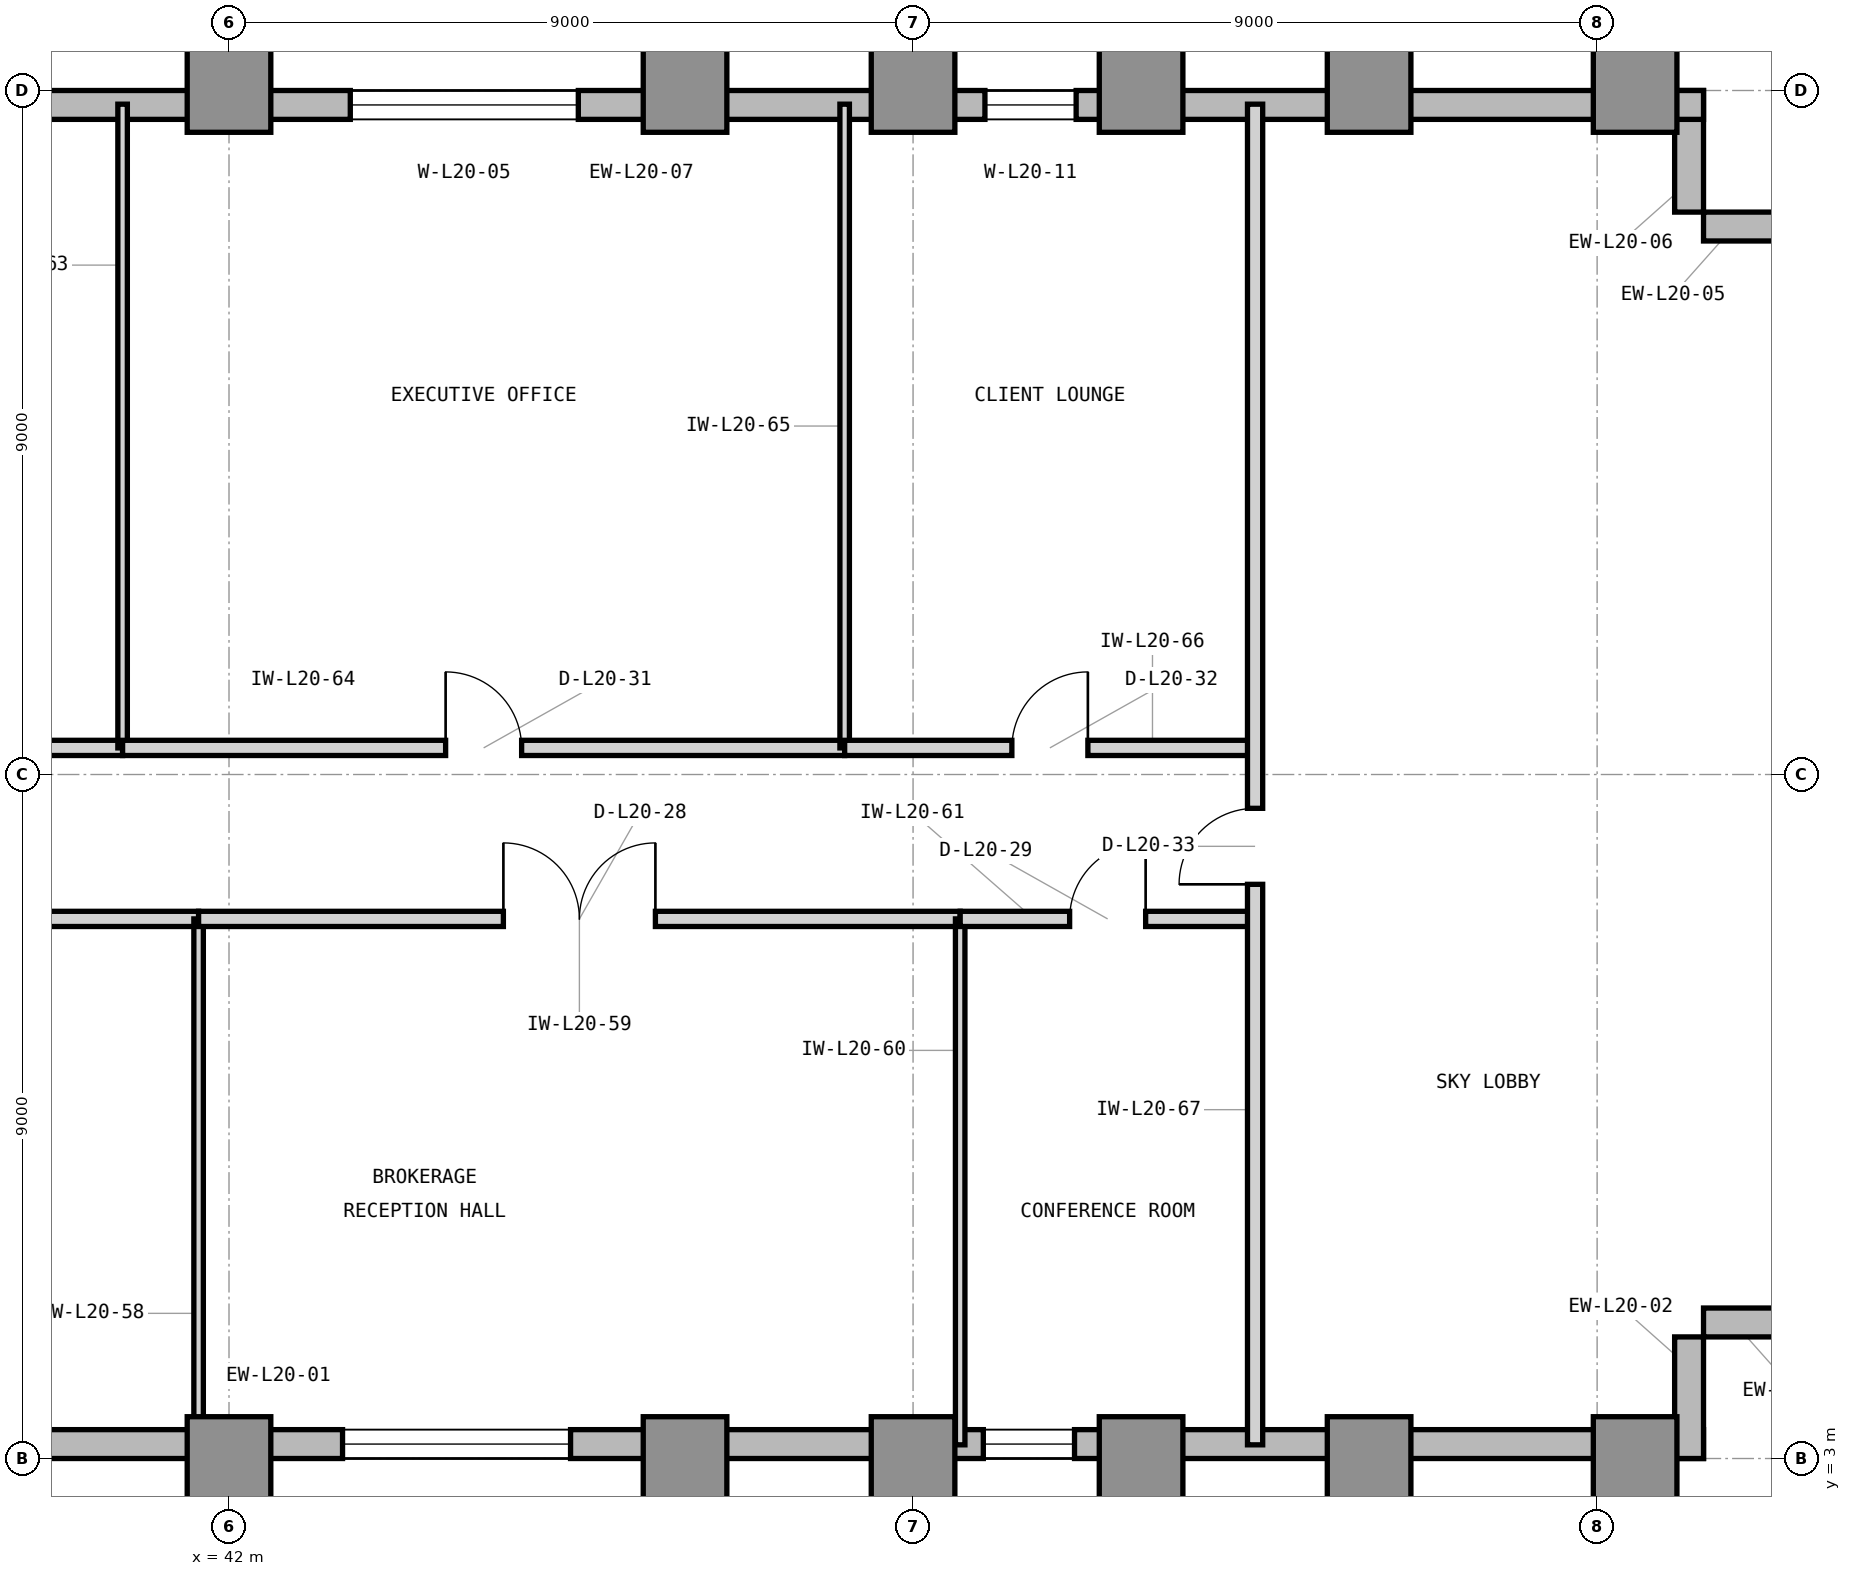
"""IFC4 building model, lengths in metres.
Left out: names, types, materials, properties, quantities, classifications, styles, units other than length and angle.
Written with IfcOpenShell. Run it as: python <this file> out.ifc"""

import sys

from ifc_helpers import new_model, si_unit, direction, frame, frame_2d, origin, origin_2d, place, context, subcontext, project, spatial, rectangle, extrude, element, fill, save


model = new_model("IFC4")
c1 = context("Model", 3, precision=1e-05, world=origin(), true_north=direction((0.0, 1.0)))
c2 = subcontext(c1, "Body", "Model", "MODEL_VIEW")
j1 = project(units=[si_unit("LENGTHUNIT", "METRE"), si_unit("PLANEANGLEUNIT", "RADIAN")], contexts=[c1])
p1 = place(None, origin())
s1 = spatial("IfcSite", under=j1, at=p1, CompositionType="ELEMENT")
p2 = place(p1, origin())
s2 = spatial("IfcBuilding", under=s1, at=p2, CompositionType="ELEMENT")
p3 = place(p2, frame((0.0, 0.0, 89.1)))
s3 = spatial("IfcBuildingStorey", under=s2, at=p3, CompositionType="ELEMENT", Elevation=89.1)
for number, where, z_axis, x_axis in (
    (1, (42.0, 3.0, 0.0), (0.0, 0.0, 1.0), (1.0, 0.0, 0.0)),
    (2, (42.0, 21.0, 0.0), (0.0, 0.0, 1.0), (1.0, 0.0, 0.0)),
    (3, (48.0, 3.0, 0.0), (0.0, 0.0, 1.0), (1.0, 0.0, 0.0)),
    (4, (48.0, 21.0, 0.0), (0.0, 0.0, 1.0), (1.0, 0.0, 0.0)),
    (5, (51.0, 3.0, 0.0), (0.0, 0.0, 1.0), (1.0, 0.0, 0.0)),
    (6, (51.0, 21.0, 0.0), (0.0, 0.0, 1.0), (1.0, 0.0, 0.0)),
    (7, (54.0, 3.0, 0.0), (0.0, 0.0, 1.0), (1.0, 0.0, 0.0)),
    (8, (54.0, 21.0, 0.0), (0.0, 0.0, 1.0), (1.0, 0.0, 0.0)),
    (9, (57.0, 3.0, 0.0), (0.0, 0.0, 1.0), (1.0, 0.0, 0.0)),
    (10, (57.0, 21.0, 0.0), (0.0, 0.0, 1.0), (1.0, 0.0, 0.0)),
    (11, (60.5, 3.0, 0.0), (0.0, 0.0, 1.0), (1.0, 0.0, 0.0)),
    (12, (60.5, 21.0, 0.0), (0.0, 0.0, 1.0), (1.0, 0.0, 0.0)),
):
    element("IfcColumn", number, at=place(p3, frame(where, z_axis=z_axis, x_axis=x_axis)), inside=s3, PredefinedType="COLUMN", context=c2, shape_type="SweptSolid", body=[
        extrude(rectangle(XDim=1.1, YDim=1.1, at=origin_2d()), origin(), (0.0, 0.0, 1.0), 4.2),
    ])
p4 = place(p3, frame((23.9, 3.19, 0.0), z_axis=(0.0, 0.0, 1.0), x_axis=(1.0, 0.0, 0.0)))
e13 = element("IfcWall", 13, at=p4, inside=s3, PredefinedType="STANDARD", context=c2, shape_type="SweptSolid", body=[
    extrude(rectangle(XDim=37.5, YDim=0.38, at=frame_2d((18.75, 0.0))), origin(), (0.0, 0.0, 1.0), 4.0),
])
p5 = place(p4, frame((10.219, 0.0, 0.7)))
e14 = element("IfcOpeningElement", 14, at=p5, cuts=e13, PredefinedType="OPENING", context=c2, shape_type="SweptSolid", body=[
    extrude(rectangle(XDim=3.0, YDim=2.6, at=frame_2d((1.5, 1.3))), frame((0.0, 0.2, 0.0), z_axis=(0.0, -1.0, 0.0), x_axis=(1.0, 0.0, 0.0)), (0.0, 0.0, 1.0), 0.4),
])
p6 = place(p4, frame((19.594, 0.0, 0.7)))
e15 = element("IfcOpeningElement", 15, at=p6, cuts=e13, PredefinedType="OPENING", context=c2, shape_type="SweptSolid", body=[
    extrude(rectangle(XDim=3.0, YDim=2.6, at=frame_2d((1.5, 1.3))), frame((0.0, 0.2, 0.0), z_axis=(0.0, -1.0, 0.0), x_axis=(1.0, 0.0, 0.0)), (0.0, 0.0, 1.0), 0.4),
])
p7 = place(p4, frame((3.514, 0.0, 0.7)))
e16 = element("IfcOpeningElement", 16, at=p7, cuts=e13, PredefinedType="OPENING", context=c2, shape_type="SweptSolid", body=[
    extrude(rectangle(XDim=3.0, YDim=2.6, at=frame_2d((1.5, 1.3))), frame((0.0, 0.2, 0.0), z_axis=(0.0, -1.0, 0.0), x_axis=(1.0, 0.0, 0.0)), (0.0, 0.0, 1.0), 0.4),
])
p8 = place(p4, frame((28.024, 0.0, 0.85)))
e17 = element("IfcOpeningElement", 17, at=p8, cuts=e13, PredefinedType="OPENING", context=c2, shape_type="SweptSolid", body=[
    extrude(rectangle(XDim=1.2, YDim=2.25, at=frame_2d((0.6, 1.125))), frame((0.0, 0.2, 0.0), z_axis=(0.0, -1.0, 0.0), x_axis=(1.0, 0.0, 0.0)), (0.0, 0.0, 1.0), 0.4),
])
for number, where, z_axis, x_axis in (
    (18, (61.21, 3.0, 0.0), (0.0, 0.0, 1.0), (0.0, 1.0, 0.0)),
    (19, (61.4, 4.79, 0.0), (0.0, 0.0, 1.0), (1.0, 0.0, 0.0)),
    (20, (63.0, 19.21, 0.0), (0.0, 0.0, 1.0), (-1.0, 0.0, 0.0)),
    (21, (61.21, 19.4, 0.0), (0.0, 0.0, 1.0), (0.0, 1.0, 0.0)),
):
    element("IfcWall", number, at=place(p3, frame(where, z_axis=z_axis, x_axis=x_axis)), inside=s3, PredefinedType="STANDARD", context=c2, shape_type="SweptSolid", body=[
        extrude(rectangle(XDim=1.6, YDim=0.38, at=frame_2d((0.8, 0.0))), origin(), (0.0, 0.0, 1.0), 4.0),
    ])
p9 = place(p3, frame((61.4, 20.81, 0.0), z_axis=(0.0, 0.0, 1.0), x_axis=(-1.0, 0.0, 0.0)))
e22 = element("IfcWall", 22, at=p9, inside=s3, PredefinedType="STANDARD", context=c2, shape_type="SweptSolid", body=[
    extrude(rectangle(XDim=27.95, YDim=0.38, at=frame_2d((13.975, 0.0))), origin(), (0.0, 0.0, 1.0), 4.0),
])
p10 = place(p9, frame((14.804, 0.0, 0.7)))
e23 = element("IfcOpeningElement", 23, at=p10, cuts=e22, PredefinedType="OPENING", context=c2, shape_type="SweptSolid", body=[
    extrude(rectangle(XDim=3.0, YDim=2.6, at=frame_2d((1.5, 1.3))), frame((0.0, 0.2, 0.0), z_axis=(0.0, -1.0, 0.0), x_axis=(1.0, 0.0, 0.0)), (0.0, 0.0, 1.0), 0.4),
])
p11 = place(p9, frame((24.721, 0.0, 0.85)))
e24 = element("IfcOpeningElement", 24, at=p11, cuts=e22, PredefinedType="OPENING", context=c2, shape_type="SweptSolid", body=[
    extrude(rectangle(XDim=1.8, YDim=2.25, at=frame_2d((0.9, 1.125))), frame((0.0, 0.2, 0.0), z_axis=(0.0, -1.0, 0.0), x_axis=(1.0, 0.0, 0.0)), (0.0, 0.0, 1.0), 0.4),
])
p12 = place(p9, frame((8.254, 0.0, 0.85)))
e25 = element("IfcOpeningElement", 25, at=p12, cuts=e22, PredefinedType="OPENING", context=c2, shape_type="SweptSolid", body=[
    extrude(rectangle(XDim=1.2, YDim=2.25, at=frame_2d((0.6, 1.125))), frame((0.0, 0.2, 0.0), z_axis=(0.0, -1.0, 0.0), x_axis=(1.0, 0.0, 0.0)), (0.0, 0.0, 1.0), 0.4),
])
p13 = place(p3, frame((31.1, 10.1, 0.0), z_axis=(0.0, 0.0, 1.0), x_axis=(1.0, 0.0, 0.0)))
e26 = element("IfcWall", 26, at=p13, inside=s3, PredefinedType="PARTITIONING", context=c2, shape_type="SweptSolid", body=[
    extrude(rectangle(XDim=10.5, YDim=0.2, at=frame_2d((5.25, 0.0))), origin(), (0.0, 0.0, 1.0), 3.93),
])
p14 = place(p13, frame((4.5, 0.0, 0.0)))
e27 = element("IfcOpeningElement", 27, at=p14, cuts=e26, PredefinedType="OPENING", context=c2, shape_type="SweptSolid", body=[
    extrude(rectangle(XDim=1.5, YDim=2.3, at=frame_2d((0.75, 1.15))), frame((0.0, 0.11, 0.0), z_axis=(0.0, -1.0, 0.0), x_axis=(1.0, 0.0, 0.0)), (0.0, 0.0, 1.0), 0.22),
])
p15 = place(p3, frame((41.6, 3.18, 0.0), z_axis=(0.0, 0.0, 1.0), x_axis=(0.0, 1.0, 0.0)))
e28 = element("IfcWall", 28, at=p15, inside=s3, PredefinedType="PARTITIONING", context=c2, shape_type="SweptSolid", body=[
    extrude(rectangle(XDim=6.92, YDim=0.125, at=frame_2d((3.46, 0.0))), origin(), (0.0, 0.0, 1.0), 3.93),
])
p16 = place(p3, frame((41.6, 10.1, 0.0), z_axis=(0.0, 0.0, 1.0), x_axis=(1.0, 0.0, 0.0)))
e29 = element("IfcWall", 29, at=p16, inside=s3, PredefinedType="PARTITIONING", context=c2, shape_type="SweptSolid", body=[
    extrude(rectangle(XDim=10.02, YDim=0.2, at=frame_2d((5.01, 0.0))), origin(), (0.0, 0.0, 1.0), 3.93),
])
p17 = place(p16, frame((4.01, 0.0, 0.0)))
e30 = element("IfcOpeningElement", 30, at=p17, cuts=e29, PredefinedType="OPENING", context=c2, shape_type="SweptSolid", body=[
    extrude(rectangle(XDim=2.0, YDim=2.5, at=frame_2d((1.0, 1.25))), frame((0.0, 0.11, 0.0), z_axis=(0.0, -1.0, 0.0), x_axis=(1.0, 0.0, 0.0)), (0.0, 0.0, 1.0), 0.22),
])
p18 = place(p3, frame((51.62, 3.18, 0.0), z_axis=(0.0, 0.0, 1.0), x_axis=(0.0, 1.0, 0.0)))
e31 = element("IfcWall", 31, at=p18, inside=s3, PredefinedType="PARTITIONING", context=c2, shape_type="SweptSolid", body=[
    extrude(rectangle(XDim=6.92, YDim=0.125, at=frame_2d((3.46, 0.0))), origin(), (0.0, 0.0, 1.0), 3.93),
])
p19 = place(p3, frame((51.62, 10.1, 0.0), z_axis=(0.0, 0.0, 1.0), x_axis=(1.0, 0.0, 0.0)))
e32 = element("IfcWall", 32, at=p19, inside=s3, PredefinedType="PARTITIONING", context=c2, shape_type="SweptSolid", body=[
    extrude(rectangle(XDim=3.88, YDim=0.2, at=frame_2d((1.94, 0.0))), origin(), (0.0, 0.0, 1.0), 3.93),
])
p20 = place(p19, frame((1.44, 0.0, 0.0)))
e33 = element("IfcOpeningElement", 33, at=p20, cuts=e32, PredefinedType="OPENING", context=c2, shape_type="SweptSolid", body=[
    extrude(rectangle(XDim=1.0, YDim=2.15, at=frame_2d((0.5, 1.075))), frame((0.0, 0.11, 0.0), z_axis=(0.0, -1.0, 0.0), x_axis=(1.0, 0.0, 0.0)), (0.0, 0.0, 1.0), 0.22),
])
p21 = place(p3, frame((31.1, 12.35, 0.0), z_axis=(0.0, 0.0, 1.0), x_axis=(1.0, 0.0, 0.0)))
e34 = element("IfcWall", 34, at=p21, inside=s3, PredefinedType="PARTITIONING", context=c2, shape_type="SweptSolid", body=[
    extrude(rectangle(XDim=9.5, YDim=0.2, at=frame_2d((4.75, 0.0))), origin(), (0.0, 0.0, 1.0), 3.93),
])
p22 = place(p21, frame((4.0, 0.0, 0.0)))
e35 = element("IfcOpeningElement", 35, at=p22, cuts=e34, PredefinedType="OPENING", context=c2, shape_type="SweptSolid", body=[
    extrude(rectangle(XDim=1.5, YDim=2.3, at=frame_2d((0.75, 1.15))), frame((0.0, 0.11, 0.0), z_axis=(0.0, -1.0, 0.0), x_axis=(1.0, 0.0, 0.0)), (0.0, 0.0, 1.0), 0.22),
])
p23 = place(p3, frame((40.6, 12.35, 0.0), z_axis=(0.0, 0.0, 1.0), x_axis=(0.0, 1.0, 0.0)))
e36 = element("IfcWall", 36, at=p23, inside=s3, PredefinedType="PARTITIONING", context=c2, shape_type="SweptSolid", body=[
    extrude(rectangle(XDim=8.47, YDim=0.125, at=frame_2d((4.235, 0.0))), origin(), (0.0, 0.0, 1.0), 3.93),
])
p24 = place(p3, frame((40.6, 12.35, 0.0), z_axis=(0.0, 0.0, 1.0), x_axis=(1.0, 0.0, 0.0)))
e37 = element("IfcWall", 37, at=p24, inside=s3, PredefinedType="PARTITIONING", context=c2, shape_type="SweptSolid", body=[
    extrude(rectangle(XDim=9.5, YDim=0.2, at=frame_2d((4.75, 0.0))), origin(), (0.0, 0.0, 1.0), 3.93),
])
p25 = place(p24, frame((4.25, 0.0, 0.0)))
e38 = element("IfcOpeningElement", 38, at=p25, cuts=e37, PredefinedType="OPENING", context=c2, shape_type="SweptSolid", body=[
    extrude(rectangle(XDim=1.0, YDim=2.15, at=frame_2d((0.5, 1.075))), frame((0.0, 0.11, 0.0), z_axis=(0.0, -1.0, 0.0), x_axis=(1.0, 0.0, 0.0)), (0.0, 0.0, 1.0), 0.22),
])
p26 = place(p3, frame((50.1, 12.35, 0.0), z_axis=(0.0, 0.0, 1.0), x_axis=(0.0, 1.0, 0.0)))
e39 = element("IfcWall", 39, at=p26, inside=s3, PredefinedType="PARTITIONING", context=c2, shape_type="SweptSolid", body=[
    extrude(rectangle(XDim=8.47, YDim=0.125, at=frame_2d((4.235, 0.0))), origin(), (0.0, 0.0, 1.0), 3.93),
])
p27 = place(p3, frame((50.1, 12.35, 0.0), z_axis=(0.0, 0.0, 1.0), x_axis=(1.0, 0.0, 0.0)))
e40 = element("IfcWall", 40, at=p27, inside=s3, PredefinedType="PARTITIONING", context=c2, shape_type="SweptSolid", body=[
    extrude(rectangle(XDim=5.4, YDim=0.2, at=frame_2d((2.7, 0.0))), origin(), (0.0, 0.0, 1.0), 3.93),
])
p28 = place(p27, frame((2.2, 0.0, 0.0)))
e41 = element("IfcOpeningElement", 41, at=p28, cuts=e40, PredefinedType="OPENING", context=c2, shape_type="SweptSolid", body=[
    extrude(rectangle(XDim=1.0, YDim=2.15, at=frame_2d((0.5, 1.075))), frame((0.0, 0.11, 0.0), z_axis=(0.0, -1.0, 0.0), x_axis=(1.0, 0.0, 0.0)), (0.0, 0.0, 1.0), 0.22),
])
p29 = place(p3, frame((55.5, 3.18, 0.0), z_axis=(0.0, 0.0, 1.0), x_axis=(0.0, 1.0, 0.0)))
e42 = element("IfcWall", 42, at=p29, inside=s3, PredefinedType="PARTITIONING", context=c2, shape_type="SweptSolid", body=[
    extrude(rectangle(XDim=17.64, YDim=0.2, at=frame_2d((8.82, 0.0))), origin(), (0.0, 0.0, 1.0), 3.93),
])
p30 = place(p29, frame((7.375, 0.0, 0.0)))
e43 = element("IfcOpeningElement", 43, at=p30, cuts=e42, PredefinedType="OPENING", context=c2, shape_type="SweptSolid", body=[
    extrude(rectangle(XDim=1.0, YDim=2.15, at=frame_2d((0.5, 1.075))), frame((0.0, 0.11, 0.0), z_axis=(0.0, -1.0, 0.0), x_axis=(1.0, 0.0, 0.0)), (0.0, 0.0, 1.0), 0.22),
])
p31 = place(p6, origin())
e44 = element("IfcWindow", 44, at=p31, inside=s3, PartitioningType="SINGLE_PANEL", PredefinedType="WINDOW", context=c2, shape_type="SweptSolid", body=[
    extrude(rectangle(XDim=3.0, YDim=2.6, at=frame_2d((1.5, 1.3))), frame((0.0, 0.11, 0.0), z_axis=(0.0, -1.0, 0.0), x_axis=(1.0, 0.0, 0.0)), (0.0, 0.0, 1.0), 0.06),
])
fill(e15, e44)
p32 = place(p10, origin())
e45 = element("IfcWindow", 45, at=p32, inside=s3, PartitioningType="SINGLE_PANEL", PredefinedType="WINDOW", context=c2, shape_type="SweptSolid", body=[
    extrude(rectangle(XDim=3.0, YDim=2.6, at=frame_2d((1.5, 1.3))), frame((0.0, 0.11, 0.0), z_axis=(0.0, -1.0, 0.0), x_axis=(1.0, 0.0, 0.0)), (0.0, 0.0, 1.0), 0.06),
])
fill(e23, e45)
p33 = place(p17, origin())
e46 = element("IfcDoor", 46, at=p33, inside=s3, OperationType="DOUBLE_DOOR_SINGLE_SWING", PredefinedType="DOOR", context=c2, shape_type="SweptSolid", body=[
    extrude(rectangle(XDim=2.0, YDim=2.5, at=frame_2d((1.0, 1.25))), frame((0.0, 0.025, 0.0), z_axis=(0.0, -1.0, 0.0), x_axis=(1.0, 0.0, 0.0)), (0.0, 0.0, 1.0), 0.05),
])
fill(e30, e46)
p34 = place(p20, origin())
e47 = element("IfcDoor", 47, at=p34, inside=s3, OperationType="SINGLE_SWING_RIGHT", PredefinedType="DOOR", context=c2, shape_type="SweptSolid", body=[
    extrude(rectangle(XDim=1.0, YDim=2.15, at=frame_2d((0.5, 1.075))), frame((0.0, 0.025, 0.0), z_axis=(0.0, -1.0, 0.0), x_axis=(1.0, 0.0, 0.0)), (0.0, 0.0, 1.0), 0.05),
])
fill(e33, e47)
p35 = place(p25, origin())
e48 = element("IfcDoor", 48, at=p35, inside=s3, OperationType="SINGLE_SWING_LEFT", PredefinedType="DOOR", context=c2, shape_type="SweptSolid", body=[
    extrude(rectangle(XDim=1.0, YDim=2.15, at=frame_2d((0.5, 1.075))), frame((0.0, 0.025, 0.0), z_axis=(0.0, -1.0, 0.0), x_axis=(1.0, 0.0, 0.0)), (0.0, 0.0, 1.0), 0.05),
])
fill(e38, e48)
p36 = place(p28, origin())
e49 = element("IfcDoor", 49, at=p36, inside=s3, OperationType="SINGLE_SWING_RIGHT", PredefinedType="DOOR", context=c2, shape_type="SweptSolid", body=[
    extrude(rectangle(XDim=1.0, YDim=2.15, at=frame_2d((0.5, 1.075))), frame((0.0, 0.025, 0.0), z_axis=(0.0, -1.0, 0.0), x_axis=(1.0, 0.0, 0.0)), (0.0, 0.0, 1.0), 0.05),
])
fill(e41, e49)
p37 = place(p30, origin())
e50 = element("IfcDoor", 50, at=p37, inside=s3, OperationType="SINGLE_SWING_LEFT", PredefinedType="DOOR", context=c2, shape_type="SweptSolid", body=[
    extrude(rectangle(XDim=1.0, YDim=2.15, at=frame_2d((0.5, 1.075))), frame((0.0, 0.025, 0.0), z_axis=(0.0, -1.0, 0.0), x_axis=(1.0, 0.0, 0.0)), (0.0, 0.0, 1.0), 0.05),
])
fill(e43, e50)
p38 = place(p8, origin())
e51 = element("IfcWindow", 51, at=p38, inside=s3, PartitioningType="SINGLE_PANEL", PredefinedType="WINDOW", context=c2, shape_type="SweptSolid", body=[
    extrude(rectangle(XDim=1.2, YDim=2.25, at=frame_2d((0.6, 1.125))), frame((0.0, 0.11, 0.0), z_axis=(0.0, -1.0, 0.0), x_axis=(1.0, 0.0, 0.0)), (0.0, 0.0, 1.0), 0.06),
])
fill(e17, e51)
p39 = place(p12, origin())
e52 = element("IfcWindow", 52, at=p39, inside=s3, PartitioningType="SINGLE_PANEL", PredefinedType="WINDOW", context=c2, shape_type="SweptSolid", body=[
    extrude(rectangle(XDim=1.2, YDim=2.25, at=frame_2d((0.6, 1.125))), frame((0.0, 0.11, 0.0), z_axis=(0.0, -1.0, 0.0), x_axis=(1.0, 0.0, 0.0)), (0.0, 0.0, 1.0), 0.06),
])
fill(e25, e52)
save(model, sys.argv[1])
